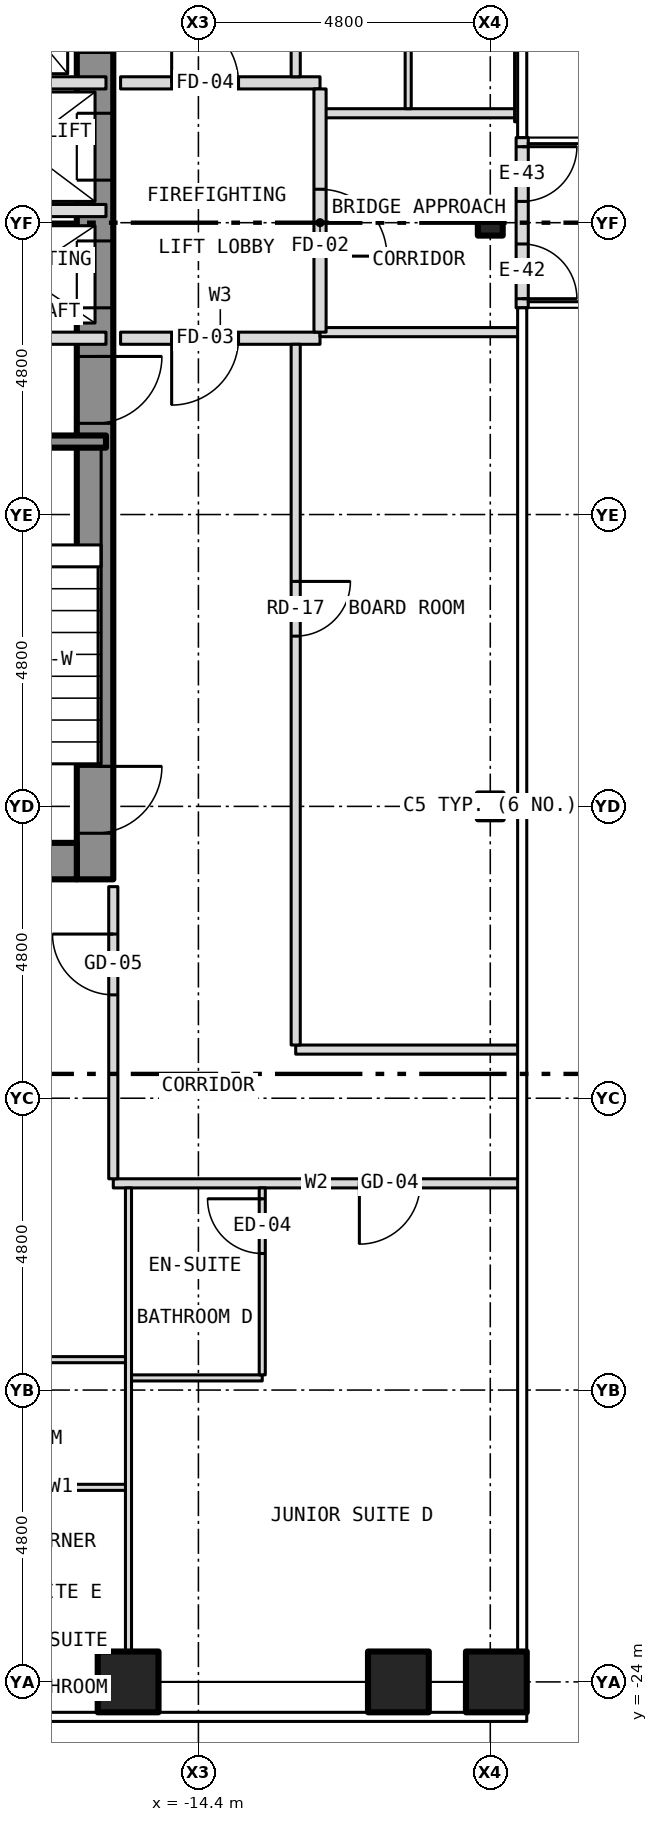
"""IFC4 building model, lengths in metres.
Left out: names, types, materials, properties, quantities, classifications, styles, units other than length and angle.
Written with IfcOpenShell. Run it as: python <this file> out.ifc"""

import sys

from ifc_helpers import new_model, si_unit, direction, frame, frame_2d, origin, origin_2d, place, context, subcontext, project, spatial, rectangle, hollow_rectangle, i_section, extrude, element, fill, save


model = new_model("IFC4")
c1 = context("Model", 3, precision=1e-05, world=origin(), true_north=direction((0.0, 1.0)))
c2 = subcontext(c1, "Body", "Model", "MODEL_VIEW")
j1 = project(units=[si_unit("LENGTHUNIT", "METRE"), si_unit("PLANEANGLEUNIT", "RADIAN")], contexts=[c1])
p1 = place(None, origin())
s1 = spatial("IfcSite", under=j1, at=p1, CompositionType="ELEMENT")
p2 = place(p1, origin())
s2 = spatial("IfcBuilding", under=s1, at=p2, CompositionType="ELEMENT")
p3 = place(p2, frame((0.0, 0.0, 81.0)))
s3 = spatial("IfcBuildingStorey", under=s2, at=p3, CompositionType="ELEMENT", Elevation=81.0)
for number, where, z_axis, x_axis in (
    (1, (-15.556, -24.0, -0.15), (0.0, 0.0, 1.0), (1.0, 0.0, 0.0)),
    (2, (-11.111, -24.0, -0.15), (0.0, 0.0, 1.0), (1.0, 0.0, 0.0)),
    (3, (-9.5, -24.0, -0.15), (0.0, 0.0, 1.0), (1.0, 0.0, 0.0)),
):
    element("IfcColumn", number, at=place(p3, frame(where, z_axis=z_axis, x_axis=x_axis)), inside=s3, PredefinedType="COLUMN", context=c2, shape_type="SweptSolid", body=[
        extrude(hollow_rectangle(XDim=1.0, YDim=1.0, WallThickness=0.06, at=origin_2d()), origin(), (0.0, 0.0, 1.0), 3.35),
    ])
for number, where, z_axis, x_axis in (
    (4, (-9.6, -9.6, -0.15), (0.0, 0.0, 1.0), (1.0, 0.0, 0.0)),
    (5, (-9.6, 0.0, -0.15), (0.0, 0.0, 1.0), (1.0, 0.0, 0.0)),
):
    element("IfcColumn", number, at=place(p3, frame(where, z_axis=z_axis, x_axis=x_axis)), inside=s3, PredefinedType="COLUMN", context=c2, shape_type="SweptSolid", body=[
        extrude(i_section(OverallWidth=0.409, OverallDepth=0.424, WebThickness=0.033, FlangeThickness=0.052, at=origin_2d()), origin(), (0.0, 0.0, 1.0), 3.35),
    ])
p4 = place(p3, frame((-16.1, -10.8, 0.0), z_axis=(0.0, 0.0, 1.0), x_axis=(0.0, 1.0, 0.0)))
e6 = element("IfcWall", 6, at=p4, inside=s3, PredefinedType="SHEAR", context=c2, shape_type="SweptSolid", body=[
    extrude(rectangle(XDim=21.6, YDim=0.6, at=frame_2d((10.8, 0.0))), origin(), (0.0, 0.0, 1.0), 2.9),
])
p5 = place(p4, frame((9.4, 0.0, 0.0)))
e7 = element("IfcOpeningElement", 7, at=p5, cuts=e6, PredefinedType="OPENING", context=c2, shape_type="SweptSolid", body=[
    extrude(rectangle(XDim=1.1, YDim=2.1, at=frame_2d((0.55, 1.05))), frame((0.0, 0.312, 0.0), z_axis=(0.0, -1.0, 0.0), x_axis=(1.0, 0.0, 0.0)), (0.0, 0.0, 1.0), 0.624),
])
p6 = place(p4, frame((11.5, 0.0, 0.0)))
e8 = element("IfcOpeningElement", 8, at=p6, cuts=e6, PredefinedType="OPENING", context=c2, shape_type="SweptSolid", body=[
    extrude(rectangle(XDim=1.1, YDim=2.1, at=frame_2d((0.55, 1.05))), frame((0.0, 0.312, 0.0), z_axis=(0.0, -1.0, 0.0), x_axis=(1.0, 0.0, 0.0)), (0.0, 0.0, 1.0), 0.624),
])
p7 = place(p4, frame((13.6, 0.0, 0.0)))
e9 = element("IfcOpeningElement", 9, at=p7, cuts=e6, PredefinedType="OPENING", context=c2, shape_type="SweptSolid", body=[
    extrude(rectangle(XDim=1.1, YDim=2.1, at=frame_2d((0.55, 1.05))), frame((0.0, 0.312, 0.0), z_axis=(0.0, -1.0, 0.0), x_axis=(1.0, 0.0, 0.0)), (0.0, 0.0, 1.0), 0.624),
])
p8 = place(p4, frame((15.7, 0.0, 0.0)))
e10 = element("IfcOpeningElement", 10, at=p8, cuts=e6, PredefinedType="OPENING", context=c2, shape_type="SweptSolid", body=[
    extrude(rectangle(XDim=1.1, YDim=2.1, at=frame_2d((0.55, 1.05))), frame((0.0, 0.312, 0.0), z_axis=(0.0, -1.0, 0.0), x_axis=(1.0, 0.0, 0.0)), (0.0, 0.0, 1.0), 0.624),
])
p9 = place(p4, frame((17.8, 0.0, 0.0)))
e11 = element("IfcOpeningElement", 11, at=p9, cuts=e6, PredefinedType="OPENING", context=c2, shape_type="SweptSolid", body=[
    extrude(rectangle(XDim=1.1, YDim=2.1, at=frame_2d((0.55, 1.05))), frame((0.0, 0.312, 0.0), z_axis=(0.0, -1.0, 0.0), x_axis=(1.0, 0.0, 0.0)), (0.0, 0.0, 1.0), 0.624),
])
p10 = place(p4, frame((0.758, 0.0, 0.0)))
e12 = element("IfcOpeningElement", 12, at=p10, cuts=e6, PredefinedType="OPENING", context=c2, shape_type="SweptSolid", body=[
    extrude(rectangle(XDim=1.1, YDim=2.1, at=frame_2d((0.55, 1.05))), frame((0.0, 0.312, 0.0), z_axis=(0.0, -1.0, 0.0), x_axis=(1.0, 0.0, 0.0)), (0.0, 0.0, 1.0), 0.624),
])
p11 = place(p4, frame((7.5, 0.0, 0.0)))
e13 = element("IfcOpeningElement", 13, at=p11, cuts=e6, PredefinedType="OPENING", context=c2, shape_type="SweptSolid", body=[
    extrude(rectangle(XDim=1.1, YDim=2.1, at=frame_2d((0.55, 1.05))), frame((0.0, 0.312, 0.0), z_axis=(0.0, -1.0, 0.0), x_axis=(1.0, 0.0, 0.0)), (0.0, 0.0, 1.0), 0.624),
])
p12 = place(p3, frame((-23.4, -10.5, 0.0), z_axis=(0.0, 0.0, 1.0), x_axis=(1.0, 0.0, 0.0)))
e14 = element("IfcWall", 14, at=p12, inside=s3, PredefinedType="SHEAR", context=c2, shape_type="SweptSolid", body=[
    extrude(rectangle(XDim=7.0, YDim=0.6, at=frame_2d((3.5, 0.0))), origin(), (0.0, 0.0, 1.0), 2.9),
])
p13 = place(p3, frame((-9.075, -1.4, 0.0), z_axis=(0.0, 0.0, 1.0), x_axis=(0.0, 1.0, 0.0)))
e15 = element("IfcWall", 15, at=p13, inside=s3, PredefinedType="SOLIDWALL", context=c2, shape_type="SweptSolid", body=[
    extrude(rectangle(XDim=2.8, YDim=0.2, at=frame_2d((1.4, 0.0))), origin(), (0.0, 0.0, 1.0), 3.5),
])
p14 = place(p13, frame((0.15, 0.0, 0.0)))
e16 = element("IfcOpeningElement", 16, at=p14, cuts=e15, PredefinedType="OPENING", context=c2, shape_type="SweptSolid", body=[
    extrude(rectangle(XDim=0.9, YDim=2.1, at=frame_2d((0.45, 1.05))), frame((0.0, 0.112, 0.0), z_axis=(0.0, -1.0, 0.0), x_axis=(1.0, 0.0, 0.0)), (0.0, 0.0, 1.0), 0.224),
])
p15 = place(p13, frame((1.75, 0.0, 0.0)))
e17 = element("IfcOpeningElement", 17, at=p15, cuts=e15, PredefinedType="OPENING", context=c2, shape_type="SweptSolid", body=[
    extrude(rectangle(XDim=0.9, YDim=2.1, at=frame_2d((0.45, 1.05))), frame((0.0, 0.112, 0.0), z_axis=(0.0, -1.0, 0.0), x_axis=(1.0, 0.0, 0.0)), (0.0, 0.0, 1.0), 0.224),
])
for number, where, z_axis, x_axis in (
    (18, (-17.75, -20.8, 0.0), (0.0, 0.0, 1.0), (1.0, 0.0, 0.0)),
    (19, (-15.55, -19.0, 0.0), (0.0, 0.0, 1.0), (1.0, 0.0, 0.0)),
):
    element("IfcWall", number, at=place(p3, frame(where, z_axis=z_axis, x_axis=x_axis)), inside=s3, PredefinedType="PARTITIONING", context=c2, shape_type="SweptSolid", body=[
        extrude(rectangle(XDim=2.2, YDim=0.1, at=frame_2d((1.1, 0.0))), origin(), (0.0, 0.0, 1.0), 3.2),
    ])
p16 = place(p3, frame((-24.53, -18.7, 0.0), z_axis=(0.0, 0.0, 1.0), x_axis=(1.0, 0.0, 0.0)))
e20 = element("IfcWall", 20, at=p16, inside=s3, PredefinedType="PARTITIONING", context=c2, shape_type="SweptSolid", body=[
    extrude(rectangle(XDim=8.98, YDim=0.1, at=frame_2d((4.49, 0.0))), origin(), (0.0, 0.0, 1.0), 3.2),
])
p17 = place(p16, frame((5.202, 0.0, 0.0)))
e21 = element("IfcOpeningElement", 21, at=p17, cuts=e20, PredefinedType="OPENING", context=c2, shape_type="SweptSolid", body=[
    extrude(rectangle(XDim=0.9, YDim=2.1, at=frame_2d((0.45, 1.05))), frame((0.0, 0.062, 0.0), z_axis=(0.0, -1.0, 0.0), x_axis=(1.0, 0.0, 0.0)), (0.0, 0.0, 1.0), 0.124),
])
p18 = place(p3, frame((-15.8, -15.8, 0.0), z_axis=(0.0, 0.0, 1.0), x_axis=(1.0, 0.0, 0.0)))
e22 = element("IfcWall", 22, at=p18, inside=s3, PredefinedType="PARTITIONING", context=c2, shape_type="SweptSolid", body=[
    extrude(rectangle(XDim=6.68, YDim=0.15, at=frame_2d((3.34, 0.0))), origin(), (0.0, 0.0, 1.0), 3.2),
])
p19 = place(p18, frame((4.047, 0.0, 0.0)))
e23 = element("IfcOpeningElement", 23, at=p19, cuts=e22, PredefinedType="OPENING", context=c2, shape_type="SweptSolid", body=[
    extrude(rectangle(XDim=1.0, YDim=2.1, at=frame_2d((0.5, 1.05))), frame((0.0, 0.087, 0.0), z_axis=(0.0, -1.0, 0.0), x_axis=(1.0, 0.0, 0.0)), (0.0, 0.0, 1.0), 0.174),
])
p20 = place(p3, frame((-12.8, -13.6, 0.0), z_axis=(0.0, 0.0, 1.0), x_axis=(1.0, 0.0, 0.0)))
e24 = element("IfcWall", 24, at=p20, inside=s3, PredefinedType="PARTITIONING", context=c2, shape_type="SweptSolid", body=[
    extrude(rectangle(XDim=3.68, YDim=0.15, at=frame_2d((1.84, 0.0))), origin(), (0.0, 0.0, 1.0), 3.2),
])
p21 = place(p3, frame((-20.0, -3.6, 0.0), z_axis=(0.0, 0.0, 1.0), x_axis=(1.0, 0.0, 0.0)))
e25 = element("IfcWall", 25, at=p21, inside=s3, PredefinedType="SHEAR", context=c2, shape_type="SweptSolid", body=[
    extrude(rectangle(XDim=4.08, YDim=0.2, at=frame_2d((2.04, 0.0))), origin(), (0.0, 0.0, 1.0), 2.9),
])
p22 = place(p3, frame((-23.88, -1.9, 0.0), z_axis=(0.0, 0.0, 1.0), x_axis=(1.0, 0.0, 0.0)))
e26 = element("IfcWall", 26, at=p22, inside=s3, PredefinedType="PARTITIONING", context=c2, shape_type="SweptSolid", body=[
    extrude(rectangle(XDim=7.96, YDim=0.2, at=frame_2d((3.98, 0.0))), origin(), (0.0, 0.0, 1.0), 2.9),
])
p23 = place(p22, frame((3.32, 0.0, 0.0)))
e27 = element("IfcOpeningElement", 27, at=p23, cuts=e26, PredefinedType="OPENING", context=c2, shape_type="SweptSolid", body=[
    extrude(rectangle(XDim=0.9, YDim=2.1, at=frame_2d((0.45, 1.05))), frame((0.0, 0.112, 0.0), z_axis=(0.0, -1.0, 0.0), x_axis=(1.0, 0.0, 0.0)), (0.0, 0.0, 1.0), 0.224),
])
p24 = place(p3, frame((-15.68, -1.9, 0.0), z_axis=(0.0, 0.0, 1.0), x_axis=(1.0, 0.0, 0.0)))
e28 = element("IfcWall", 28, at=p24, inside=s3, PredefinedType="PARTITIONING", context=c2, shape_type="SweptSolid", body=[
    extrude(rectangle(XDim=3.28, YDim=0.2, at=frame_2d((1.64, 0.0))), origin(), (0.0, 0.0, 1.0), 3.2),
])
p25 = place(p24, frame((0.84, 0.0, 0.0)))
e29 = element("IfcOpeningElement", 29, at=p25, cuts=e28, PredefinedType="OPENING", context=c2, shape_type="SweptSolid", body=[
    extrude(rectangle(XDim=1.1, YDim=2.1, at=frame_2d((0.55, 1.05))), frame((0.0, 0.112, 0.0), z_axis=(0.0, -1.0, 0.0), x_axis=(1.0, 0.0, 0.0)), (0.0, 0.0, 1.0), 0.224),
])
p26 = place(p3, frame((-12.4, -1.8, 0.0), z_axis=(0.0, 0.0, 1.0), x_axis=(1.0, 0.0, 0.0)))
e30 = element("IfcWall", 30, at=p26, inside=s3, PredefinedType="PARTITIONING", context=c2, shape_type="SweptSolid", body=[
    extrude(rectangle(XDim=3.28, YDim=0.15, at=frame_2d((1.64, 0.0))), origin(), (0.0, 0.0, 1.0), 3.2),
])
p27 = place(p3, frame((-18.8, 0.2, 0.0), z_axis=(0.0, 0.0, 1.0), x_axis=(1.0, 0.0, 0.0)))
e31 = element("IfcWall", 31, at=p27, inside=s3, PredefinedType="PARTITIONING", context=c2, shape_type="SweptSolid", body=[
    extrude(rectangle(XDim=2.88, YDim=0.2, at=frame_2d((1.44, 0.0))), origin(), (0.0, 0.0, 1.0), 2.9),
])
p28 = place(p3, frame((-12.4, 1.8, 0.0), z_axis=(0.0, 0.0, 1.0), x_axis=(1.0, 0.0, 0.0)))
e32 = element("IfcWall", 32, at=p28, inside=s3, PredefinedType="PARTITIONING", context=c2, shape_type="SweptSolid", body=[
    extrude(rectangle(XDim=3.25, YDim=0.15, at=frame_2d((1.625, 0.0))), origin(), (0.0, 0.0, 1.0), 3.2),
])
p29 = place(p3, frame((-18.8, 2.3, 0.0), z_axis=(0.0, 0.0, 1.0), x_axis=(1.0, 0.0, 0.0)))
e33 = element("IfcWall", 33, at=p29, inside=s3, PredefinedType="PARTITIONING", context=c2, shape_type="SweptSolid", body=[
    extrude(rectangle(XDim=2.88, YDim=0.2, at=frame_2d((1.44, 0.0))), origin(), (0.0, 0.0, 1.0), 2.9),
])
p30 = place(p3, frame((-15.68, 2.3, 0.0), z_axis=(0.0, 0.0, 1.0), x_axis=(1.0, 0.0, 0.0)))
e34 = element("IfcWall", 34, at=p30, inside=s3, PredefinedType="PARTITIONING", context=c2, shape_type="SweptSolid", body=[
    extrude(rectangle(XDim=3.28, YDim=0.2, at=frame_2d((1.64, 0.0))), origin(), (0.0, 0.0, 1.0), 3.2),
])
p31 = place(p30, frame((0.84, 0.0, 0.0)))
e35 = element("IfcOpeningElement", 35, at=p31, cuts=e34, PredefinedType="OPENING", context=c2, shape_type="SweptSolid", body=[
    extrude(rectangle(XDim=1.1, YDim=2.1, at=frame_2d((0.55, 1.05))), frame((0.0, 0.112, 0.0), z_axis=(0.0, -1.0, 0.0), x_axis=(1.0, 0.0, 0.0)), (0.0, 0.0, 1.0), 0.224),
])
p32 = place(p3, frame((-15.8, -15.725, 0.0), z_axis=(0.0, 0.0, 1.0), x_axis=(0.0, 1.0, 0.0)))
e36 = element("IfcWall", 36, at=p32, inside=s3, PredefinedType="PARTITIONING", context=c2, shape_type="SweptSolid", body=[
    extrude(rectangle(XDim=4.805, YDim=0.15, at=frame_2d((2.403, 0.0))), origin(), (0.0, 0.0, 1.0), 3.2),
])
p33 = place(p32, frame((3.025, 0.0, 0.0)))
e37 = element("IfcOpeningElement", 37, at=p33, cuts=e36, PredefinedType="OPENING", context=c2, shape_type="SweptSolid", body=[
    extrude(rectangle(XDim=1.0, YDim=2.1, at=frame_2d((0.5, 1.05))), frame((0.0, 0.087, 0.0), z_axis=(0.0, -1.0, 0.0), x_axis=(1.0, 0.0, 0.0)), (0.0, 0.0, 1.0), 0.174),
])
p34 = place(p3, frame((-15.55, -23.88, 0.0), z_axis=(0.0, 0.0, 1.0), x_axis=(0.0, 1.0, 0.0)))
e38 = element("IfcWall", 38, at=p34, inside=s3, PredefinedType="PARTITIONING", context=c2, shape_type="SweptSolid", body=[
    extrude(rectangle(XDim=8.005, YDim=0.1, at=frame_2d((4.002, 0.0))), origin(), (0.0, 0.0, 1.0), 3.2),
])
p35 = place(p3, frame((-13.35, -18.95, 0.0), z_axis=(0.0, 0.0, 1.0), x_axis=(0.0, 1.0, 0.0)))
e39 = element("IfcWall", 39, at=p35, inside=s3, PredefinedType="PARTITIONING", context=c2, shape_type="SweptSolid", body=[
    extrude(rectangle(XDim=3.075, YDim=0.1, at=frame_2d((1.538, 0.0))), origin(), (0.0, 0.0, 1.0), 3.2),
])
p36 = place(p35, frame((1.996, 0.0, 0.0)))
e40 = element("IfcOpeningElement", 40, at=p36, cuts=e39, PredefinedType="OPENING", context=c2, shape_type="SweptSolid", body=[
    extrude(rectangle(XDim=0.9, YDim=2.1, at=frame_2d((0.45, 1.05))), frame((0.0, 0.062, 0.0), z_axis=(0.0, -1.0, 0.0), x_axis=(1.0, 0.0, 0.0)), (0.0, 0.0, 1.0), 0.124),
])
p37 = place(p3, frame((-12.8, -13.525, 0.0), z_axis=(0.0, 0.0, 1.0), x_axis=(0.0, 1.0, 0.0)))
e41 = element("IfcWall", 41, at=p37, inside=s3, PredefinedType="PARTITIONING", context=c2, shape_type="SweptSolid", body=[
    extrude(rectangle(XDim=11.525, YDim=0.15, at=frame_2d((5.762, 0.0))), origin(), (0.0, 0.0, 1.0), 3.2),
])
p38 = place(p37, frame((6.725, 0.0, 0.0)))
e42 = element("IfcOpeningElement", 42, at=p38, cuts=e41, PredefinedType="OPENING", context=c2, shape_type="SweptSolid", body=[
    extrude(rectangle(XDim=0.9, YDim=2.1, at=frame_2d((0.45, 1.05))), frame((0.0, 0.087, 0.0), z_axis=(0.0, -1.0, 0.0), x_axis=(1.0, 0.0, 0.0)), (0.0, 0.0, 1.0), 0.174),
])
p39 = place(p3, frame((-12.8, 2.4, 0.0), z_axis=(0.0, 0.0, 1.0), x_axis=(0.0, 1.0, 0.0)))
e43 = element("IfcWall", 43, at=p39, inside=s3, PredefinedType="PARTITIONING", context=c2, shape_type="SweptSolid", body=[
    extrude(rectangle(XDim=3.425, YDim=0.15, at=frame_2d((1.712, 0.0))), origin(), (0.0, 0.0, 1.0), 3.2),
])
p40 = place(p39, frame((1.25, 0.0, 0.0)))
e44 = element("IfcOpeningElement", 44, at=p40, cuts=e43, PredefinedType="OPENING", context=c2, shape_type="SweptSolid", body=[
    extrude(rectangle(XDim=0.9, YDim=2.1, at=frame_2d((0.45, 1.05))), frame((0.0, 0.087, 0.0), z_axis=(0.0, -1.0, 0.0), x_axis=(1.0, 0.0, 0.0)), (0.0, 0.0, 1.0), 0.174),
])
p41 = place(p3, frame((-12.4, -1.8, 0.0), z_axis=(0.0, 0.0, 1.0), x_axis=(0.0, 1.0, 0.0)))
e45 = element("IfcWall", 45, at=p41, inside=s3, PredefinedType="PARTITIONING", context=c2, shape_type="SweptSolid", body=[
    extrude(rectangle(XDim=4.0, YDim=0.2, at=frame_2d((2.0, 0.0))), origin(), (0.0, 0.0, 1.0), 3.2),
])
p42 = place(p41, frame((1.25, 0.0, 0.0)))
e46 = element("IfcOpeningElement", 46, at=p42, cuts=e45, PredefinedType="OPENING", context=c2, shape_type="SweptSolid", body=[
    extrude(rectangle(XDim=1.1, YDim=2.1, at=frame_2d((0.55, 1.05))), frame((0.0, 0.112, 0.0), z_axis=(0.0, -1.0, 0.0), x_axis=(1.0, 0.0, 0.0)), (0.0, 0.0, 1.0), 0.224),
])
p43 = place(p3, frame((-10.95, 1.875, 0.0), z_axis=(0.0, 0.0, 1.0), x_axis=(0.0, 1.0, 0.0)))
e47 = element("IfcWall", 47, at=p43, inside=s3, PredefinedType="PARTITIONING", context=c2, shape_type="SweptSolid", body=[
    extrude(rectangle(XDim=3.95, YDim=0.1, at=frame_2d((1.975, 0.0))), origin(), (0.0, 0.0, 1.0), 3.2),
])
p44 = place(p3, frame((-9.15, 1.66, 0.0), z_axis=(0.0, 0.0, 1.0), x_axis=(0.0, 1.0, 0.0)))
e48 = element("IfcWall", 48, at=p44, inside=s3, PredefinedType="PARTITIONING", context=c2, shape_type="SweptSolid", body=[
    extrude(rectangle(XDim=4.38, YDim=0.1, at=frame_2d((2.19, 0.0))), origin(), (0.0, 0.0, 1.0), 3.2),
])
p45 = place(p14, origin())
e49 = element("IfcDoor", 49, at=p45, inside=s3, OperationType="SINGLE_SWING_LEFT", PredefinedType="DOOR", context=c2, shape_type="SweptSolid", body=[
    extrude(rectangle(XDim=0.9, YDim=2.1, at=frame_2d((0.45, 1.05))), frame((0.0, 0.025, 0.0), z_axis=(0.0, -1.0, 0.0), x_axis=(1.0, 0.0, 0.0)), (0.0, 0.0, 1.0), 0.05),
])
fill(e16, e49)
p46 = place(p15, origin())
e50 = element("IfcDoor", 50, at=p46, inside=s3, OperationType="SINGLE_SWING_RIGHT", PredefinedType="DOOR", context=c2, shape_type="SweptSolid", body=[
    extrude(rectangle(XDim=0.9, YDim=2.1, at=frame_2d((0.45, 1.05))), frame((0.0, 0.025, 0.0), z_axis=(0.0, -1.0, 0.0), x_axis=(1.0, 0.0, 0.0)), (0.0, 0.0, 1.0), 0.05),
])
fill(e17, e50)
p47 = place(p5, origin())
e51 = element("IfcDoor", 51, at=p47, inside=s3, OperationType="SLIDING_TO_LEFT", PredefinedType="DOOR", context=c2, shape_type="SweptSolid", body=[
    extrude(rectangle(XDim=1.1, YDim=2.1, at=frame_2d((0.55, 1.05))), frame((0.0, 0.025, 0.0), z_axis=(0.0, -1.0, 0.0), x_axis=(1.0, 0.0, 0.0)), (0.0, 0.0, 1.0), 0.05),
])
fill(e7, e51)
p48 = place(p6, origin())
e52 = element("IfcDoor", 52, at=p48, inside=s3, OperationType="SLIDING_TO_LEFT", PredefinedType="DOOR", context=c2, shape_type="SweptSolid", body=[
    extrude(rectangle(XDim=1.1, YDim=2.1, at=frame_2d((0.55, 1.05))), frame((0.0, 0.025, 0.0), z_axis=(0.0, -1.0, 0.0), x_axis=(1.0, 0.0, 0.0)), (0.0, 0.0, 1.0), 0.05),
])
fill(e8, e52)
p49 = place(p10, origin())
e53 = element("IfcDoor", 53, at=p49, inside=s3, OperationType="SINGLE_SWING_RIGHT", PredefinedType="DOOR", context=c2, shape_type="SweptSolid", body=[
    extrude(rectangle(XDim=1.1, YDim=2.1, at=frame_2d((0.55, 1.05))), frame((0.0, 0.025, 0.0), z_axis=(0.0, -1.0, 0.0), x_axis=(1.0, 0.0, 0.0)), (0.0, 0.0, 1.0), 0.05),
])
fill(e12, e53)
p50 = place(p11, origin())
e54 = element("IfcDoor", 54, at=p50, inside=s3, OperationType="SINGLE_SWING_RIGHT", PredefinedType="DOOR", context=c2, shape_type="SweptSolid", body=[
    extrude(rectangle(XDim=1.1, YDim=2.1, at=frame_2d((0.55, 1.05))), frame((0.0, 0.025, 0.0), z_axis=(0.0, -1.0, 0.0), x_axis=(1.0, 0.0, 0.0)), (0.0, 0.0, 1.0), 0.05),
])
fill(e13, e54)
p51 = place(p42, origin())
e55 = element("IfcDoor", 55, at=p51, inside=s3, OperationType="SINGLE_SWING_LEFT", PredefinedType="DOOR", context=c2, shape_type="SweptSolid", body=[
    extrude(rectangle(XDim=1.1, YDim=2.1, at=frame_2d((0.55, 1.05))), frame((0.0, 0.025, 0.0), z_axis=(0.0, -1.0, 0.0), x_axis=(1.0, 0.0, 0.0)), (0.0, 0.0, 1.0), 0.05),
])
fill(e46, e55)
p52 = place(p25, origin())
e56 = element("IfcDoor", 56, at=p52, inside=s3, OperationType="SINGLE_SWING_LEFT", PredefinedType="DOOR", context=c2, shape_type="SweptSolid", body=[
    extrude(rectangle(XDim=1.1, YDim=2.1, at=frame_2d((0.55, 1.05))), frame((0.0, 0.025, 0.0), z_axis=(0.0, -1.0, 0.0), x_axis=(1.0, 0.0, 0.0)), (0.0, 0.0, 1.0), 0.05),
])
fill(e29, e56)
p53 = place(p31, origin())
e57 = element("IfcDoor", 57, at=p53, inside=s3, OperationType="SINGLE_SWING_LEFT", PredefinedType="DOOR", context=c2, shape_type="SweptSolid", body=[
    extrude(rectangle(XDim=1.1, YDim=2.1, at=frame_2d((0.55, 1.05))), frame((0.0, 0.025, 0.0), z_axis=(0.0, -1.0, 0.0), x_axis=(1.0, 0.0, 0.0)), (0.0, 0.0, 1.0), 0.05),
])
fill(e35, e57)
p54 = place(p19, origin())
e58 = element("IfcDoor", 58, at=p54, inside=s3, OperationType="SINGLE_SWING_LEFT", PredefinedType="DOOR", context=c2, shape_type="SweptSolid", body=[
    extrude(rectangle(XDim=1.0, YDim=2.1, at=frame_2d((0.5, 1.05))), frame((0.0, 0.025, 0.0), z_axis=(0.0, -1.0, 0.0), x_axis=(1.0, 0.0, 0.0)), (0.0, 0.0, 1.0), 0.05),
])
fill(e23, e58)
p55 = place(p36, origin())
e59 = element("IfcDoor", 59, at=p55, inside=s3, OperationType="SINGLE_SWING_RIGHT", PredefinedType="DOOR", context=c2, shape_type="SweptSolid", body=[
    extrude(rectangle(XDim=0.9, YDim=2.1, at=frame_2d((0.45, 1.05))), frame((0.0, 0.025, 0.0), z_axis=(0.0, -1.0, 0.0), x_axis=(1.0, 0.0, 0.0)), (0.0, 0.0, 1.0), 0.05),
])
fill(e40, e59)
p56 = place(p33, origin())
e60 = element("IfcDoor", 60, at=p56, inside=s3, OperationType="SINGLE_SWING_RIGHT", PredefinedType="DOOR", context=c2, shape_type="SweptSolid", body=[
    extrude(rectangle(XDim=1.0, YDim=2.1, at=frame_2d((0.5, 1.05))), frame((0.0, 0.025, 0.0), z_axis=(0.0, -1.0, 0.0), x_axis=(1.0, 0.0, 0.0)), (0.0, 0.0, 1.0), 0.05),
])
fill(e37, e60)
p57 = place(p38, origin())
e61 = element("IfcDoor", 61, at=p57, inside=s3, OperationType="SINGLE_SWING_RIGHT", PredefinedType="DOOR", context=c2, shape_type="SweptSolid", body=[
    extrude(rectangle(XDim=0.9, YDim=2.1, at=frame_2d((0.45, 1.05))), frame((0.0, 0.025, 0.0), z_axis=(0.0, -1.0, 0.0), x_axis=(1.0, 0.0, 0.0)), (0.0, 0.0, 1.0), 0.05),
])
fill(e42, e61)
save(model, sys.argv[1])
